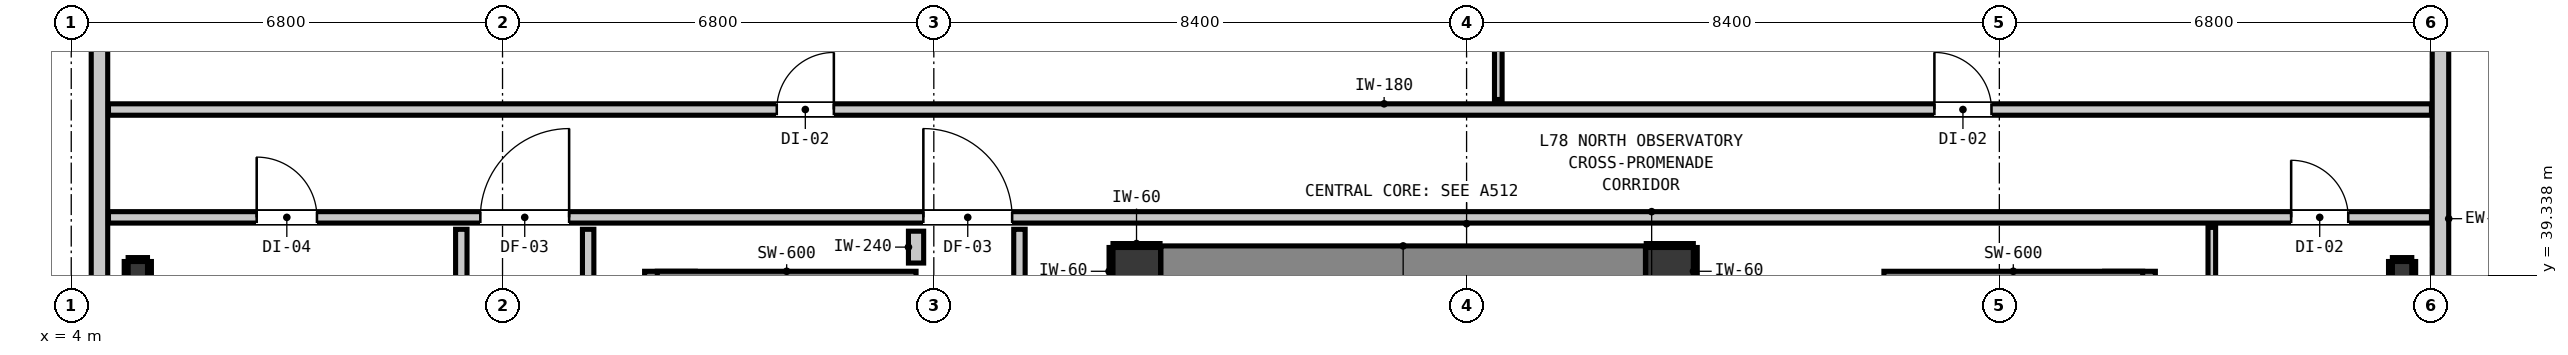
"""IFC4 building model, lengths in metres.
Left out: names, types, materials, properties, quantities, classifications, styles, units other than length and angle.
Written with IfcOpenShell. Run it as: python <this file> out.ifc"""

import sys

from ifc_helpers import new_model, si_unit, direction, frame, frame_2d, origin, origin_2d, place, context, subcontext, project, spatial, rectangle, i_section, extrude, element, fill, save


model = new_model("IFC4")
c1 = context("Model", 3, precision=1e-05, world=origin(), true_north=direction((0.0, 1.0)))
c2 = subcontext(c1, "Body", "Model", "MODEL_VIEW")
j1 = project(units=[si_unit("LENGTHUNIT", "METRE"), si_unit("PLANEANGLEUNIT", "RADIAN")], contexts=[c1])
p1 = place(None, origin())
s1 = spatial("IfcSite", under=j1, at=p1, CompositionType="ELEMENT")
p2 = place(p1, origin())
s2 = spatial("IfcBuilding", under=s1, at=p2, CompositionType="ELEMENT")
p3 = place(p2, frame((0.0, 0.0, 268.88)))
s3 = spatial("IfcBuildingStorey", under=s2, at=p3, CompositionType="ELEMENT", Elevation=268.88)
for number, where, z_axis, x_axis in (
    (1, (20.8, 39.4, 0.0), (0.0, 0.0, 1.0), (1.0, 0.0, 0.0)),
    (2, (29.2, 39.4, 0.0), (0.0, 0.0, 1.0), (1.0, 0.0, 0.0)),
):
    element("IfcColumn", number, at=place(p3, frame(where, z_axis=z_axis, x_axis=x_axis)), inside=s3, PredefinedType="COLUMN", context=c2, shape_type="SweptSolid", body=[
        extrude(rectangle(XDim=0.75, YDim=0.75, at=origin_2d()), origin(), (0.0, 0.0, 1.0), 4.6),
    ])
p4 = place(p3, frame((13.44, 31.08, 0.0), z_axis=(0.0, 0.0, 1.0), x_axis=(0.0, 1.0, 0.0)))
e3 = element("IfcWall", 3, at=p4, inside=s3, PredefinedType="SHEAR", context=c2, shape_type="SweptSolid", body=[
    extrude(rectangle(XDim=8.32, YDim=0.8, at=frame_2d((4.16, 0.0))), origin(), (0.0, 0.0, 1.0), 4.6),
])
p5 = place(p3, frame((13.24, 39.1, 0.0), z_axis=(0.0, 0.0, 1.0), x_axis=(1.0, 0.0, 0.0)))
e4 = element("IfcWall", 4, at=p5, inside=s3, PredefinedType="SHEAR", context=c2, shape_type="SweptSolid", body=[
    extrude(rectangle(XDim=4.08, YDim=0.6, at=frame_2d((2.04, 0.0))), origin(), (0.0, 0.0, 1.0), 4.6),
])
p6 = place(p3, frame((36.46, 31.08, 0.0), z_axis=(0.0, 0.0, 1.0), x_axis=(0.0, 1.0, 0.0)))
e5 = element("IfcWall", 5, at=p6, inside=s3, PredefinedType="SHEAR", context=c2, shape_type="SweptSolid", body=[
    extrude(rectangle(XDim=8.32, YDim=0.8, at=frame_2d((4.16, 0.0))), origin(), (0.0, 0.0, 1.0), 4.6),
])
p7 = place(p3, frame((32.58, 39.1, 0.0), z_axis=(0.0, 0.0, 1.0), x_axis=(1.0, 0.0, 0.0)))
e6 = element("IfcWall", 6, at=p7, inside=s3, PredefinedType="SHEAR", context=c2, shape_type="SweptSolid", body=[
    extrude(rectangle(XDim=4.08, YDim=0.6, at=frame_2d((2.04, 0.0))), origin(), (0.0, 0.0, 1.0), 4.6),
])
p8 = place(p3, frame((21.18, 39.4, 0.0), z_axis=(0.0, 0.0, 1.0), x_axis=(1.0, 0.0, 0.0)))
e7 = element("IfcWall", 7, at=p8, inside=s3, PredefinedType="SHEAR", context=c2, shape_type="SweptSolid", body=[
    extrude(rectangle(XDim=7.64, YDim=0.8, at=frame_2d((3.82, 0.0))), origin(), (0.0, 0.0, 1.0), 4.6),
])
for number, where, z_axis, x_axis in (
    (8, (5.05, 39.4, 0.0), (0.0, 0.0, 1.0), (1.0, 0.0, 0.0)),
    (9, (40.75, 39.4, 0.0), (0.0, 0.0, 1.0), (1.0, 0.0, 0.0)),
):
    element("IfcColumn", number, at=place(p3, frame(where, z_axis=z_axis, x_axis=x_axis)), inside=s3, PredefinedType="COLUMN", context=c2, shape_type="SweptSolid", body=[
        extrude(i_section(OverallWidth=0.305, OverallDepth=0.308, WebThickness=0.01, FlangeThickness=0.015, at=origin_2d()), origin(), (0.0, 0.0, 1.0), 4.6),
    ])
p9 = place(p3, frame((4.445, 18.545, 0.0), z_axis=(0.0, 0.0, 1.0), x_axis=(0.0, 1.0, 0.0)))
e10 = element("IfcWall", 10, at=p9, inside=s3, PredefinedType="STANDARD", context=c2, shape_type="SweptSolid", body=[
    extrude(rectangle(XDim=30.31, YDim=0.26, at=frame_2d((15.155, 0.0))), origin(), (0.0, 0.0, 1.0), 4.38),
])
p10 = place(p9, frame((26.038, 0.0, 0.85)))
e11 = element("IfcOpeningElement", 11, at=p10, cuts=e10, PredefinedType="OPENING", context=c2, shape_type="SweptSolid", body=[
    extrude(rectangle(XDim=1.65, YDim=1.75, at=frame_2d((0.825, 0.875))), frame((0.0, 0.14, 0.0), z_axis=(0.0, -1.0, 0.0), x_axis=(1.0, 0.0, 0.0)), (0.0, 0.0, 1.0), 0.28),
])
p11 = place(p3, frame((41.355, 48.855, 0.0), z_axis=(0.0, 0.0, 1.0), x_axis=(0.0, -1.0, 0.0)))
e12 = element("IfcWall", 12, at=p11, inside=s3, PredefinedType="STANDARD", context=c2, shape_type="SweptSolid", body=[
    extrude(rectangle(XDim=30.31, YDim=0.26, at=frame_2d((15.155, 0.0))), origin(), (0.0, 0.0, 1.0), 4.38),
])
p12 = place(p11, frame((2.622, 0.0, 0.85)))
e13 = element("IfcOpeningElement", 13, at=p12, cuts=e12, PredefinedType="OPENING", context=c2, shape_type="SweptSolid", body=[
    extrude(rectangle(XDim=1.65, YDim=1.75, at=frame_2d((0.825, 0.875))), frame((0.0, 0.14, 0.0), z_axis=(0.0, -1.0, 0.0), x_axis=(1.0, 0.0, 0.0)), (0.0, 0.0, 1.0), 0.28),
])
p13 = place(p11, frame((22.103, 0.0, 0.85)))
e14 = element("IfcOpeningElement", 14, at=p13, cuts=e12, PredefinedType="OPENING", context=c2, shape_type="SweptSolid", body=[
    extrude(rectangle(XDim=1.65, YDim=1.75, at=frame_2d((0.825, 0.875))), frame((0.0, 0.14, 0.0), z_axis=(0.0, -1.0, 0.0), x_axis=(1.0, 0.0, 0.0)), (0.0, 0.0, 1.0), 0.28),
])
p14 = place(p11, frame((12.98, 0.0, 0.85)))
e15 = element("IfcOpeningElement", 15, at=p14, cuts=e12, PredefinedType="OPENING", context=c2, shape_type="SweptSolid", body=[
    extrude(rectangle(XDim=1.65, YDim=1.75, at=frame_2d((0.825, 0.875))), frame((0.0, 0.14, 0.0), z_axis=(0.0, -1.0, 0.0), x_axis=(1.0, 0.0, 0.0)), (0.0, 0.0, 1.0), 0.28),
])
p15 = place(p3, frame((4.587, 40.25, 0.0), z_axis=(0.0, 0.0, 1.0), x_axis=(1.0, 0.0, 0.0)))
e16 = element("IfcWall", 16, at=p15, inside=s3, PredefinedType="PARTITIONING", context=c2, shape_type="SweptSolid", body=[
    extrude(rectangle(XDim=36.626, YDim=0.18, at=frame_2d((18.313, 0.0))), origin(), (0.0, 0.0, 1.0), 4.38),
])
p16 = place(p15, frame((12.848, 0.0, 0.0)))
e17 = element("IfcOpeningElement", 17, at=p16, cuts=e16, PredefinedType="OPENING", context=c2, shape_type="SweptSolid", body=[
    extrude(rectangle(XDim=1.4, YDim=2.15, at=frame_2d((0.7, 1.075))), frame((0.0, 0.1, 0.0), z_axis=(0.0, -1.0, 0.0), x_axis=(1.0, 0.0, 0.0)), (0.0, 0.0, 1.0), 0.2),
])
p17 = place(p15, frame((5.863, 0.0, 0.0)))
e18 = element("IfcOpeningElement", 18, at=p17, cuts=e16, PredefinedType="OPENING", context=c2, shape_type="SweptSolid", body=[
    extrude(rectangle(XDim=1.4, YDim=2.15, at=frame_2d((0.7, 1.075))), frame((0.0, 0.1, 0.0), z_axis=(0.0, -1.0, 0.0), x_axis=(1.0, 0.0, 0.0)), (0.0, 0.0, 1.0), 0.2),
])
p18 = place(p15, frame((2.337, 0.0, 0.0)))
e19 = element("IfcOpeningElement", 19, at=p18, cuts=e16, PredefinedType="OPENING", context=c2, shape_type="SweptSolid", body=[
    extrude(rectangle(XDim=0.95, YDim=2.1, at=frame_2d((0.475, 1.05))), frame((0.0, 0.1, 0.0), z_axis=(0.0, -1.0, 0.0), x_axis=(1.0, 0.0, 0.0)), (0.0, 0.0, 1.0), 0.2),
])
p19 = place(p15, frame((34.414, 0.0, 0.0)))
e20 = element("IfcOpeningElement", 20, at=p19, cuts=e16, PredefinedType="OPENING", context=c2, shape_type="SweptSolid", body=[
    extrude(rectangle(XDim=0.9, YDim=2.1, at=frame_2d((0.45, 1.05))), frame((0.0, 0.1, 0.0), z_axis=(0.0, -1.0, 0.0), x_axis=(1.0, 0.0, 0.0)), (0.0, 0.0, 1.0), 0.2),
])
p20 = place(p3, frame((4.587, 41.95, 0.0), z_axis=(0.0, 0.0, 1.0), x_axis=(1.0, 0.0, 0.0)))
e21 = element("IfcWall", 21, at=p20, inside=s3, PredefinedType="PARTITIONING", context=c2, shape_type="SweptSolid", body=[
    extrude(rectangle(XDim=36.626, YDim=0.18, at=frame_2d((18.313, 0.0))), origin(), (0.0, 0.0, 1.0), 4.38),
])
p21 = place(p20, frame((10.537, 0.0, 0.0)))
e22 = element("IfcOpeningElement", 22, at=p21, cuts=e21, PredefinedType="OPENING", context=c2, shape_type="SweptSolid", body=[
    extrude(rectangle(XDim=0.9, YDim=2.1, at=frame_2d((0.45, 1.05))), frame((0.0, 0.1, 0.0), z_axis=(0.0, -1.0, 0.0), x_axis=(1.0, 0.0, 0.0)), (0.0, 0.0, 1.0), 0.2),
])
p22 = place(p20, frame((28.789, 0.0, 0.0)))
e23 = element("IfcOpeningElement", 23, at=p22, cuts=e21, PredefinedType="OPENING", context=c2, shape_type="SweptSolid", body=[
    extrude(rectangle(XDim=0.9, YDim=2.1, at=frame_2d((0.45, 1.05))), frame((0.0, 0.1, 0.0), z_axis=(0.0, -1.0, 0.0), x_axis=(1.0, 0.0, 0.0)), (0.0, 0.0, 1.0), 0.2),
])
p23 = place(p3, frame((17.32, 39.53, 0.0), z_axis=(0.0, 0.0, 1.0), x_axis=(0.0, 1.0, 0.0)))
e24 = element("IfcWall", 24, at=p23, inside=s3, PredefinedType="PARTITIONING", context=c2, shape_type="SweptSolid", body=[
    extrude(rectangle(XDim=0.502, YDim=0.24, at=frame_2d((0.251, 0.0))), origin(), (0.0, 0.0, 1.0), 4.38),
])
p24 = place(p3, frame((10.15, 35.838, 0.0), z_axis=(0.0, 0.0, 1.0), x_axis=(0.0, 1.0, 0.0)))
e25 = element("IfcWall", 25, at=p24, inside=s3, PredefinedType="PARTITIONING", context=c2, shape_type="SweptSolid", body=[
    extrude(rectangle(XDim=4.224, YDim=0.18, at=frame_2d((2.112, 0.0))), origin(), (0.0, 0.0, 1.0), 4.38),
])
p25 = place(p3, frame((12.15, 21.368, 0.0), z_axis=(0.0, 0.0, 1.0), x_axis=(0.0, 1.0, 0.0)))
e26 = element("IfcWall", 26, at=p25, inside=s3, PredefinedType="PARTITIONING", context=c2, shape_type="SweptSolid", body=[
    extrude(rectangle(XDim=18.694, YDim=0.18, at=frame_2d((9.347, 0.0))), origin(), (0.0, 0.0, 1.0), 4.38),
])
p26 = place(p3, frame((18.95, 39.058, 0.0), z_axis=(0.0, 0.0, 1.0), x_axis=(0.0, 1.0, 0.0)))
e27 = element("IfcWall", 27, at=p26, inside=s3, PredefinedType="PARTITIONING", context=c2, shape_type="SweptSolid", body=[
    extrude(rectangle(XDim=1.004, YDim=0.18, at=frame_2d((0.502, 0.0))), origin(), (0.0, 0.0, 1.0), 4.38),
])
p27 = place(p3, frame((26.5, 42.108, 0.0), z_axis=(0.0, 0.0, 1.0), x_axis=(0.0, 1.0, 0.0)))
e28 = element("IfcWall", 28, at=p27, inside=s3, PredefinedType="PARTITIONING", context=c2, shape_type="SweptSolid", body=[
    extrude(rectangle(XDim=8.705, YDim=0.12, at=frame_2d((4.353, 0.0))), origin(), (0.0, 0.0, 1.0), 4.38),
])
p28 = place(p3, frame((37.75, 29.928, 0.0), z_axis=(0.0, 0.0, 1.0), x_axis=(0.0, 1.0, 0.0)))
e29 = element("IfcWall", 29, at=p28, inside=s3, PredefinedType="PARTITIONING", context=c2, shape_type="SweptSolid", body=[
    extrude(rectangle(XDim=10.164, YDim=0.12, at=frame_2d((5.082, 0.0))), origin(), (0.0, 0.0, 1.0), 4.38),
])
p29 = place(p3, frame((20.425, 39.807, 0.0), z_axis=(0.0, 0.0, 1.0), x_axis=(1.0, 0.0, 0.0)))
e30 = element("IfcWall", 30, at=p29, inside=s3, PredefinedType="PARTITIONING", context=c2, shape_type="SweptSolid", body=[
    extrude(rectangle(XDim=0.742, YDim=0.06, at=frame_2d((0.371, 0.0))), origin(), (0.0, 0.0, 1.0), 1.45),
])
p30 = place(p3, frame((20.393, 39.025, 0.0), z_axis=(0.0, 0.0, 1.0), x_axis=(0.0, 1.0, 0.0)))
e31 = element("IfcWall", 31, at=p30, inside=s3, PredefinedType="PARTITIONING", context=c2, shape_type="SweptSolid", body=[
    extrude(rectangle(XDim=0.75, YDim=0.06, at=frame_2d((0.375, 0.0))), origin(), (0.0, 0.0, 1.0), 1.45),
])
p31 = place(p3, frame((28.833, 39.807, 0.0), z_axis=(0.0, 0.0, 1.0), x_axis=(1.0, 0.0, 0.0)))
e32 = element("IfcWall", 32, at=p31, inside=s3, PredefinedType="PARTITIONING", context=c2, shape_type="SweptSolid", body=[
    extrude(rectangle(XDim=0.742, YDim=0.06, at=frame_2d((0.371, 0.0))), origin(), (0.0, 0.0, 1.0), 1.45),
])
p32 = place(p3, frame((29.607, 39.025, 0.0), z_axis=(0.0, 0.0, 1.0), x_axis=(0.0, 1.0, 0.0)))
e33 = element("IfcWall", 33, at=p32, inside=s3, PredefinedType="PARTITIONING", context=c2, shape_type="SweptSolid", body=[
    extrude(rectangle(XDim=0.75, YDim=0.06, at=frame_2d((0.375, 0.0))), origin(), (0.0, 0.0, 1.0), 1.45),
])
p33 = place(p3, frame((4.897, 39.586, 0.0), z_axis=(0.0, 0.0, 1.0), x_axis=(1.0, 0.0, 0.0)))
e34 = element("IfcWall", 34, at=p33, inside=s3, PredefinedType="PARTITIONING", context=c2, shape_type="SweptSolid", body=[
    extrude(rectangle(XDim=0.305, YDim=0.06, at=frame_2d((0.152, 0.0))), origin(), (0.0, 0.0, 1.0), 1.45),
])
for number, where, z_axis, x_axis in (
    (35, (4.865, 39.246, 0.0), (0.0, 0.0, 1.0), (0.0, 1.0, 0.0)),
    (36, (5.234, 39.246, 0.0), (0.0, 0.0, 1.0), (0.0, 1.0, 0.0)),
):
    element("IfcWall", number, at=place(p3, frame(where, z_axis=z_axis, x_axis=x_axis)), inside=s3, PredefinedType="PARTITIONING", context=c2, shape_type="SweptSolid", body=[
        extrude(rectangle(XDim=0.308, YDim=0.06, at=frame_2d((0.154, 0.0))), origin(), (0.0, 0.0, 1.0), 1.45),
    ])
p34 = place(p3, frame((40.597, 39.586, 0.0), z_axis=(0.0, 0.0, 1.0), x_axis=(1.0, 0.0, 0.0)))
e37 = element("IfcWall", 37, at=p34, inside=s3, PredefinedType="PARTITIONING", context=c2, shape_type="SweptSolid", body=[
    extrude(rectangle(XDim=0.306, YDim=0.06, at=frame_2d((0.153, 0.0))), origin(), (0.0, 0.0, 1.0), 1.45),
])
for number, where, z_axis, x_axis in (
    (38, (40.566, 39.246, 0.0), (0.0, 0.0, 1.0), (0.0, 1.0, 0.0)),
    (39, (40.934, 39.246, 0.0), (0.0, 0.0, 1.0), (0.0, 1.0, 0.0)),
):
    element("IfcWall", number, at=place(p3, frame(where, z_axis=z_axis, x_axis=x_axis)), inside=s3, PredefinedType="PARTITIONING", context=c2, shape_type="SweptSolid", body=[
        extrude(rectangle(XDim=0.308, YDim=0.06, at=frame_2d((0.154, 0.0))), origin(), (0.0, 0.0, 1.0), 1.45),
    ])
p35 = place(p16, origin())
e40 = element("IfcDoor", 40, at=p35, inside=s3, OperationType="SINGLE_SWING_LEFT", PredefinedType="DOOR", context=c2, shape_type="SweptSolid", body=[
    extrude(rectangle(XDim=1.4, YDim=2.15, at=frame_2d((0.7, 1.075))), frame((0.0, 0.025, 0.0), z_axis=(0.0, -1.0, 0.0), x_axis=(1.0, 0.0, 0.0)), (0.0, 0.0, 1.0), 0.05),
])
fill(e17, e40)
p36 = place(p17, origin())
e41 = element("IfcDoor", 41, at=p36, inside=s3, OperationType="SINGLE_SWING_RIGHT", PredefinedType="DOOR", context=c2, shape_type="SweptSolid", body=[
    extrude(rectangle(XDim=1.4, YDim=2.15, at=frame_2d((0.7, 1.075))), frame((0.0, 0.025, 0.0), z_axis=(0.0, -1.0, 0.0), x_axis=(1.0, 0.0, 0.0)), (0.0, 0.0, 1.0), 0.05),
])
fill(e18, e41)
p37 = place(p21, origin())
e42 = element("IfcDoor", 42, at=p37, inside=s3, OperationType="SINGLE_SWING_RIGHT", PredefinedType="DOOR", context=c2, shape_type="SweptSolid", body=[
    extrude(rectangle(XDim=0.9, YDim=2.1, at=frame_2d((0.45, 1.05))), frame((0.0, 0.025, 0.0), z_axis=(0.0, -1.0, 0.0), x_axis=(1.0, 0.0, 0.0)), (0.0, 0.0, 1.0), 0.05),
])
fill(e22, e42)
p38 = place(p22, origin())
e43 = element("IfcDoor", 43, at=p38, inside=s3, OperationType="SINGLE_SWING_LEFT", PredefinedType="DOOR", context=c2, shape_type="SweptSolid", body=[
    extrude(rectangle(XDim=0.9, YDim=2.1, at=frame_2d((0.45, 1.05))), frame((0.0, 0.025, 0.0), z_axis=(0.0, -1.0, 0.0), x_axis=(1.0, 0.0, 0.0)), (0.0, 0.0, 1.0), 0.05),
])
fill(e23, e43)
p39 = place(p18, origin())
e44 = element("IfcDoor", 44, at=p39, inside=s3, OperationType="SINGLE_SWING_LEFT", PredefinedType="DOOR", context=c2, shape_type="SweptSolid", body=[
    extrude(rectangle(XDim=0.95, YDim=2.1, at=frame_2d((0.475, 1.05))), frame((0.0, 0.025, 0.0), z_axis=(0.0, -1.0, 0.0), x_axis=(1.0, 0.0, 0.0)), (0.0, 0.0, 1.0), 0.05),
])
fill(e19, e44)
p40 = place(p19, origin())
e45 = element("IfcDoor", 45, at=p40, inside=s3, OperationType="SINGLE_SWING_LEFT", PredefinedType="DOOR", context=c2, shape_type="SweptSolid", body=[
    extrude(rectangle(XDim=0.9, YDim=2.1, at=frame_2d((0.45, 1.05))), frame((0.0, 0.025, 0.0), z_axis=(0.0, -1.0, 0.0), x_axis=(1.0, 0.0, 0.0)), (0.0, 0.0, 1.0), 0.05),
])
fill(e20, e45)
save(model, sys.argv[1])
